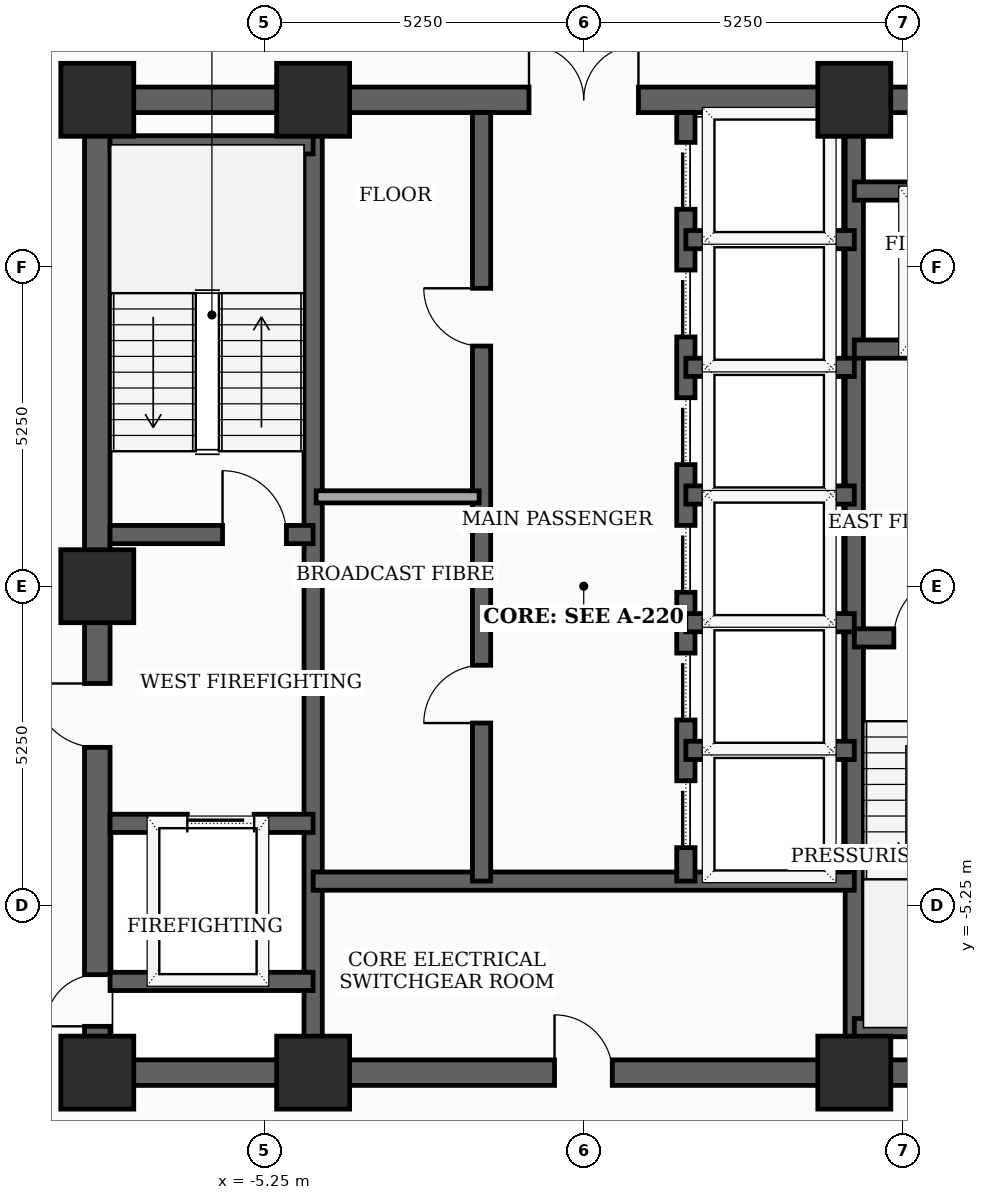
"""IFC4 building model, lengths in metres.
Left out: names, types, materials, properties, quantities, classifications, styles, units other than length and angle.
Written with IfcOpenShell. Run it as: python <this file> out.ifc"""

import sys

from ifc_helpers import new_model, si_unit, direction, frame, frame_2d, origin, origin_2d, place, context, subcontext, project, spatial, rectangle, extrude, element, fill, save


model = new_model("IFC4")
c1 = context("Model", 3, precision=1e-05, world=origin(), true_north=direction((0.0, 1.0)))
c2 = subcontext(c1, "Body", "Model", "MODEL_VIEW")
j1 = project(units=[si_unit("LENGTHUNIT", "METRE"), si_unit("PLANEANGLEUNIT", "RADIAN")], contexts=[c1])
p1 = place(None, origin())
s1 = spatial("IfcSite", under=j1, at=p1, CompositionType="ELEMENT")
p2 = place(p1, origin())
s2 = spatial("IfcBuilding", under=s1, at=p2, CompositionType="ELEMENT")
p3 = place(p2, frame((0.0, 0.0, 187.9)))
s3 = spatial("IfcBuildingStorey", under=s2, at=p3, CompositionType="ELEMENT", Elevation=187.9)
for number, where, z_axis, x_axis in (
    (1, (-8.0, -8.0, 0.0), (0.0, 0.0, 1.0), (1.0, 0.0, 0.0)),
    (2, (-4.45, -8.0, 0.0), (0.0, 0.0, 1.0), (1.0, 0.0, 0.0)),
    (3, (4.45, -8.0, 0.0), (0.0, 0.0, 1.0), (1.0, 0.0, 0.0)),
    (4, (4.45, 8.0, 0.0), (0.0, 0.0, 1.0), (1.0, 0.0, 0.0)),
    (5, (-4.45, 8.0, 0.0), (0.0, 0.0, 1.0), (1.0, 0.0, 0.0)),
    (6, (-8.0, 8.0, 0.0), (0.0, 0.0, 1.0), (1.0, 0.0, 0.0)),
    (7, (-8.0, 0.0, 0.0), (0.0, 0.0, 1.0), (1.0, 0.0, 0.0)),
):
    element("IfcColumn", number, at=place(p3, frame(where, z_axis=z_axis, x_axis=x_axis)), inside=s3, PredefinedType="COLUMN", context=c2, shape_type="SweptSolid", body=[
        extrude(rectangle(XDim=1.2, YDim=1.2, at=origin_2d()), origin(), (0.0, 0.0, 1.0), 3.7),
    ])
p4 = place(p3, frame((-8.0, -8.0, 0.0), z_axis=(0.0, 0.0, 1.0), x_axis=(0.0, 1.0, 0.0)))
e8 = element("IfcWall", 8, at=p4, inside=s3, PredefinedType="SHEAR", context=c2, shape_type="SweptSolid", body=[
    extrude(rectangle(XDim=16.0, YDim=0.42, at=frame_2d((8.0, 0.0))), origin(), (0.0, 0.0, 1.0), 3.5),
])
p5 = place(p4, frame((0.761, 0.0, 0.0)))
e9 = element("IfcOpeningElement", 9, at=p5, cuts=e8, PredefinedType="OPENING", context=c2, shape_type="SweptSolid", body=[
    extrude(rectangle(XDim=0.85, YDim=2.02, at=frame_2d((0.425, 1.01))), frame((0.0, 0.22, 0.0), z_axis=(0.0, -1.0, 0.0), x_axis=(1.0, 0.0, 0.0)), (0.0, 0.0, 1.0), 0.44),
])
p6 = place(p4, frame((5.35, 0.0, 0.0)))
e10 = element("IfcOpeningElement", 10, at=p6, cuts=e8, PredefinedType="OPENING", context=c2, shape_type="SweptSolid", body=[
    extrude(rectangle(XDim=1.05, YDim=2.15, at=frame_2d((0.525, 1.075))), frame((0.0, 0.22, 0.0), z_axis=(0.0, -1.0, 0.0), x_axis=(1.0, 0.0, 0.0)), (0.0, 0.0, 1.0), 0.44),
])
p7 = place(p3, frame((-8.0, -8.0, 0.0), z_axis=(0.0, 0.0, 1.0), x_axis=(1.0, 0.0, 0.0)))
e11 = element("IfcWall", 11, at=p7, inside=s3, PredefinedType="SHEAR", context=c2, shape_type="SweptSolid", body=[
    extrude(rectangle(XDim=16.0, YDim=0.42, at=frame_2d((8.0, 0.0))), origin(), (0.0, 0.0, 1.0), 3.5),
])
p8 = place(p7, frame((7.52, 0.0, 0.0)))
e12 = element("IfcOpeningElement", 12, at=p8, cuts=e11, PredefinedType="OPENING", context=c2, shape_type="SweptSolid", body=[
    extrude(rectangle(XDim=0.95, YDim=2.1, at=frame_2d((0.475, 1.05))), frame((0.0, 0.22, 0.0), z_axis=(0.0, -1.0, 0.0), x_axis=(1.0, 0.0, 0.0)), (0.0, 0.0, 1.0), 0.44),
])
p9 = place(p3, frame((-8.0, 8.0, 0.0), z_axis=(0.0, 0.0, 1.0), x_axis=(1.0, 0.0, 0.0)))
e13 = element("IfcWall", 13, at=p9, inside=s3, PredefinedType="SHEAR", context=c2, shape_type="SweptSolid", body=[
    extrude(rectangle(XDim=16.0, YDim=0.42, at=frame_2d((8.0, 0.0))), origin(), (0.0, 0.0, 1.0), 3.5),
])
p10 = place(p9, frame((7.1, 0.0, 0.0)))
e14 = element("IfcOpeningElement", 14, at=p10, cuts=e13, PredefinedType="OPENING", context=c2, shape_type="SweptSolid", body=[
    extrude(rectangle(XDim=1.8, YDim=2.15, at=frame_2d((0.9, 1.075))), frame((0.0, 0.22, 0.0), z_axis=(0.0, -1.0, 0.0), x_axis=(1.0, 0.0, 0.0)), (0.0, 0.0, 1.0), 0.44),
])
for number, where, z_axis, x_axis in (
    (15, (-4.45, -7.79, 0.0), (0.0, 0.0, 1.0), (0.0, 1.0, 0.0)),
    (16, (4.45, -7.79, 0.0), (0.0, 0.0, 1.0), (0.0, 1.0, 0.0)),
):
    element("IfcWall", number, at=place(p3, frame(where, z_axis=z_axis, x_axis=x_axis)), inside=s3, PredefinedType="SHEAR", context=c2, shape_type="SweptSolid", body=[
        extrude(rectangle(XDim=15.58, YDim=0.3, at=frame_2d((7.79, 0.0))), origin(), (0.0, 0.0, 1.0), 3.5),
    ])
p11 = place(p3, frame((-7.79, 0.85, 0.0), z_axis=(0.0, 0.0, 1.0), x_axis=(1.0, 0.0, 0.0)))
e17 = element("IfcWall", 17, at=p11, inside=s3, PredefinedType="SHEAR", context=c2, shape_type="SweptSolid", body=[
    extrude(rectangle(XDim=3.34, YDim=0.3, at=frame_2d((1.67, 0.0))), origin(), (0.0, 0.0, 1.0), 3.5),
])
p12 = place(p11, frame((1.85, 0.0, 0.0)))
e18 = element("IfcOpeningElement", 18, at=p12, cuts=e17, PredefinedType="OPENING", context=c2, shape_type="SweptSolid", body=[
    extrude(rectangle(XDim=1.05, YDim=2.15, at=frame_2d((0.525, 1.075))), frame((0.0, 0.16, 0.0), z_axis=(0.0, -1.0, 0.0), x_axis=(1.0, 0.0, 0.0)), (0.0, 0.0, 1.0), 0.32),
])
p13 = place(p3, frame((-7.79, 7.26, 0.0), z_axis=(0.0, 0.0, 1.0), x_axis=(1.0, 0.0, 0.0)))
e19 = element("IfcWall", 19, at=p13, inside=s3, PredefinedType="SHEAR", context=c2, shape_type="SweptSolid", body=[
    extrude(rectangle(XDim=3.34, YDim=0.3, at=frame_2d((1.67, 0.0))), origin(), (0.0, 0.0, 1.0), 3.5),
])
p14 = place(p3, frame((4.45, -0.85, 0.0), z_axis=(0.0, 0.0, 1.0), x_axis=(1.0, 0.0, 0.0)))
e20 = element("IfcWall", 20, at=p14, inside=s3, PredefinedType="SHEAR", context=c2, shape_type="SweptSolid", body=[
    extrude(rectangle(XDim=3.34, YDim=0.3, at=frame_2d((1.67, 0.0))), origin(), (0.0, 0.0, 1.0), 3.5),
])
p15 = place(p14, frame((0.65, 0.0, 0.0)))
e21 = element("IfcOpeningElement", 21, at=p15, cuts=e20, PredefinedType="OPENING", context=c2, shape_type="SweptSolid", body=[
    extrude(rectangle(XDim=1.05, YDim=2.15, at=frame_2d((0.525, 1.075))), frame((0.0, 0.16, 0.0), z_axis=(0.0, -1.0, 0.0), x_axis=(1.0, 0.0, 0.0)), (0.0, 0.0, 1.0), 0.32),
])
p16 = place(p3, frame((4.45, -7.26, 0.0), z_axis=(0.0, 0.0, 1.0), x_axis=(1.0, 0.0, 0.0)))
e22 = element("IfcWall", 22, at=p16, inside=s3, PredefinedType="SHEAR", context=c2, shape_type="SweptSolid", body=[
    extrude(rectangle(XDim=3.55, YDim=0.3, at=frame_2d((1.775, 0.0))), origin(), (0.0, 0.0, 1.0), 3.5),
])
p17 = place(p3, frame((-7.79, -3.9, 0.0), z_axis=(0.0, 0.0, 1.0), x_axis=(1.0, 0.0, 0.0)))
e23 = element("IfcWall", 23, at=p17, inside=s3, PredefinedType="SHEAR", context=c2, shape_type="SweptSolid", body=[
    extrude(rectangle(XDim=3.34, YDim=0.3, at=frame_2d((1.67, 0.0))), origin(), (0.0, 0.0, 1.0), 3.5),
])
p18 = place(p17, frame((1.27, 0.0, 0.0)))
e24 = element("IfcOpeningElement", 24, at=p18, cuts=e23, PredefinedType="OPENING", context=c2, shape_type="SweptSolid", body=[
    extrude(rectangle(XDim=1.1, YDim=2.1, at=frame_2d((0.55, 1.05))), frame((0.0, 0.16, 0.0), z_axis=(0.0, -1.0, 0.0), x_axis=(1.0, 0.0, 0.0)), (0.0, 0.0, 1.0), 0.32),
])
p19 = place(p3, frame((-7.79, -6.5, 0.0), z_axis=(0.0, 0.0, 1.0), x_axis=(1.0, 0.0, 0.0)))
e25 = element("IfcWall", 25, at=p19, inside=s3, PredefinedType="SHEAR", context=c2, shape_type="SweptSolid", body=[
    extrude(rectangle(XDim=3.34, YDim=0.3, at=frame_2d((1.67, 0.0))), origin(), (0.0, 0.0, 1.0), 3.5),
])
p20 = place(p3, frame((4.45, 3.9, 0.0), z_axis=(0.0, 0.0, 1.0), x_axis=(1.0, 0.0, 0.0)))
e26 = element("IfcWall", 26, at=p20, inside=s3, PredefinedType="SHEAR", context=c2, shape_type="SweptSolid", body=[
    extrude(rectangle(XDim=3.34, YDim=0.3, at=frame_2d((1.67, 0.0))), origin(), (0.0, 0.0, 1.0), 3.5),
])
p21 = place(p20, frame((1.18, 0.0, 0.0)))
e27 = element("IfcOpeningElement", 27, at=p21, cuts=e26, PredefinedType="OPENING", context=c2, shape_type="SweptSolid", body=[
    extrude(rectangle(XDim=1.1, YDim=2.1, at=frame_2d((0.55, 1.05))), frame((0.0, 0.16, 0.0), z_axis=(0.0, -1.0, 0.0), x_axis=(1.0, 0.0, 0.0)), (0.0, 0.0, 1.0), 0.32),
])
p22 = place(p3, frame((4.45, 6.5, 0.0), z_axis=(0.0, 0.0, 1.0), x_axis=(1.0, 0.0, 0.0)))
e28 = element("IfcWall", 28, at=p22, inside=s3, PredefinedType="SHEAR", context=c2, shape_type="SweptSolid", body=[
    extrude(rectangle(XDim=3.34, YDim=0.3, at=frame_2d((1.67, 0.0))), origin(), (0.0, 0.0, 1.0), 3.5),
])
p23 = place(p3, frame((-4.45, -4.85, 0.0), z_axis=(0.0, 0.0, 1.0), x_axis=(1.0, 0.0, 0.0)))
e29 = element("IfcWall", 29, at=p23, inside=s3, PredefinedType="SHEAR", context=c2, shape_type="SweptSolid", body=[
    extrude(rectangle(XDim=8.9, YDim=0.3, at=frame_2d((4.45, 0.0))), origin(), (0.0, 0.0, 1.0), 3.5),
])
p24 = place(p3, frame((-1.68, -4.85, 0.0), z_axis=(0.0, 0.0, 1.0), x_axis=(0.0, 1.0, 0.0)))
e30 = element("IfcWall", 30, at=p24, inside=s3, PredefinedType="SHEAR", context=c2, shape_type="SweptSolid", body=[
    extrude(rectangle(XDim=12.64, YDim=0.3, at=frame_2d((6.32, 0.0))), origin(), (0.0, 0.0, 1.0), 3.5),
])
p25 = place(p24, frame((2.6, 0.0, 0.0)))
e31 = element("IfcOpeningElement", 31, at=p25, cuts=e30, PredefinedType="OPENING", context=c2, shape_type="SweptSolid", body=[
    extrude(rectangle(XDim=0.95, YDim=2.1, at=frame_2d((0.475, 1.05))), frame((0.0, 0.16, 0.0), z_axis=(0.0, -1.0, 0.0), x_axis=(1.0, 0.0, 0.0)), (0.0, 0.0, 1.0), 0.32),
])
p26 = place(p24, frame((8.8, 0.0, 0.0)))
e32 = element("IfcOpeningElement", 32, at=p26, cuts=e30, PredefinedType="OPENING", context=c2, shape_type="SweptSolid", body=[
    extrude(rectangle(XDim=0.95, YDim=2.1, at=frame_2d((0.475, 1.05))), frame((0.0, 0.16, 0.0), z_axis=(0.0, -1.0, 0.0), x_axis=(1.0, 0.0, 0.0)), (0.0, 0.0, 1.0), 0.32),
])
p27 = place(p3, frame((1.68, -4.85, 0.0), z_axis=(0.0, 0.0, 1.0), x_axis=(0.0, 1.0, 0.0)))
e33 = element("IfcWall", 33, at=p27, inside=s3, PredefinedType="SHEAR", context=c2, shape_type="SweptSolid", body=[
    extrude(rectangle(XDim=12.64, YDim=0.3, at=frame_2d((6.32, 0.0))), origin(), (0.0, 0.0, 1.0), 3.5),
])
p28 = place(p27, frame((0.55, 0.0, 0.0)))
e34 = element("IfcOpeningElement", 34, at=p28, cuts=e33, PredefinedType="OPENING", context=c2, shape_type="SweptSolid", body=[
    extrude(rectangle(XDim=1.1, YDim=2.1, at=frame_2d((0.55, 1.05))), frame((0.0, 0.16, 0.0), z_axis=(0.0, -1.0, 0.0), x_axis=(1.0, 0.0, 0.0)), (0.0, 0.0, 1.0), 0.32),
])
p29 = place(p27, frame((2.65, 0.0, 0.0)))
e35 = element("IfcOpeningElement", 35, at=p29, cuts=e33, PredefinedType="OPENING", context=c2, shape_type="SweptSolid", body=[
    extrude(rectangle(XDim=1.1, YDim=2.1, at=frame_2d((0.55, 1.05))), frame((0.0, 0.16, 0.0), z_axis=(0.0, -1.0, 0.0), x_axis=(1.0, 0.0, 0.0)), (0.0, 0.0, 1.0), 0.32),
])
p30 = place(p27, frame((4.75, 0.0, 0.0)))
e36 = element("IfcOpeningElement", 36, at=p30, cuts=e33, PredefinedType="OPENING", context=c2, shape_type="SweptSolid", body=[
    extrude(rectangle(XDim=1.1, YDim=2.1, at=frame_2d((0.55, 1.05))), frame((0.0, 0.16, 0.0), z_axis=(0.0, -1.0, 0.0), x_axis=(1.0, 0.0, 0.0)), (0.0, 0.0, 1.0), 0.32),
])
p31 = place(p27, frame((6.85, 0.0, 0.0)))
e37 = element("IfcOpeningElement", 37, at=p31, cuts=e33, PredefinedType="OPENING", context=c2, shape_type="SweptSolid", body=[
    extrude(rectangle(XDim=1.1, YDim=2.1, at=frame_2d((0.55, 1.05))), frame((0.0, 0.16, 0.0), z_axis=(0.0, -1.0, 0.0), x_axis=(1.0, 0.0, 0.0)), (0.0, 0.0, 1.0), 0.32),
])
p32 = place(p27, frame((8.95, 0.0, 0.0)))
e38 = element("IfcOpeningElement", 38, at=p32, cuts=e33, PredefinedType="OPENING", context=c2, shape_type="SweptSolid", body=[
    extrude(rectangle(XDim=1.1, YDim=2.1, at=frame_2d((0.55, 1.05))), frame((0.0, 0.16, 0.0), z_axis=(0.0, -1.0, 0.0), x_axis=(1.0, 0.0, 0.0)), (0.0, 0.0, 1.0), 0.32),
])
p33 = place(p27, frame((11.05, 0.0, 0.0)))
e39 = element("IfcOpeningElement", 39, at=p33, cuts=e33, PredefinedType="OPENING", context=c2, shape_type="SweptSolid", body=[
    extrude(rectangle(XDim=1.1, YDim=2.1, at=frame_2d((0.55, 1.05))), frame((0.0, 0.16, 0.0), z_axis=(0.0, -1.0, 0.0), x_axis=(1.0, 0.0, 0.0)), (0.0, 0.0, 1.0), 0.32),
])
for number, where, z_axis, x_axis in (
    (40, (1.68, 1.5, 0.0), (0.0, 0.0, 1.0), (1.0, 0.0, 0.0)),
    (41, (1.68, 3.6, 0.0), (0.0, 0.0, 1.0), (1.0, 0.0, 0.0)),
    (42, (1.68, 5.7, 0.0), (0.0, 0.0, 1.0), (1.0, 0.0, 0.0)),
    (43, (1.68, -2.7, 0.0), (0.0, 0.0, 1.0), (1.0, 0.0, 0.0)),
    (44, (1.68, -0.6, 0.0), (0.0, 0.0, 1.0), (1.0, 0.0, 0.0)),
):
    element("IfcWall", number, at=place(p3, frame(where, z_axis=z_axis, x_axis=x_axis)), inside=s3, PredefinedType="SHEAR", context=c2, shape_type="SweptSolid", body=[
        extrude(rectangle(XDim=2.77, YDim=0.3, at=frame_2d((1.385, 0.0))), origin(), (0.0, 0.0, 1.0), 3.5),
    ])
p34 = place(p3, frame((-4.4, 1.47, 0.0), z_axis=(0.0, 0.0, 1.0), x_axis=(1.0, 0.0, 0.0)))
e45 = element("IfcWall", 45, at=p34, inside=s3, PredefinedType="SOLIDWALL", context=c2, shape_type="SweptSolid", body=[
    extrude(rectangle(XDim=2.68, YDim=0.2, at=frame_2d((1.34, 0.0))), origin(), (0.0, 0.0, 1.0), 3.5),
])
p35 = place(p5, origin())
e46 = element("IfcDoor", 46, at=p35, inside=s3, OperationType="SINGLE_SWING_LEFT", PredefinedType="TRAPDOOR", context=c2, shape_type="SweptSolid", body=[
    extrude(rectangle(XDim=0.85, YDim=2.02, at=frame_2d((0.425, 1.01))), frame((0.0, 0.025, 0.0), z_axis=(0.0, -1.0, 0.0), x_axis=(1.0, 0.0, 0.0)), (0.0, 0.0, 1.0), 0.05),
])
fill(e9, e46)
p36 = place(p6, origin())
e47 = element("IfcDoor", 47, at=p36, inside=s3, OperationType="SINGLE_SWING_RIGHT", PredefinedType="DOOR", context=c2, shape_type="SweptSolid", body=[
    extrude(rectangle(XDim=1.05, YDim=2.15, at=frame_2d((0.525, 1.075))), frame((0.0, 0.025, 0.0), z_axis=(0.0, -1.0, 0.0), x_axis=(1.0, 0.0, 0.0)), (0.0, 0.0, 1.0), 0.05),
])
fill(e10, e47)
p37 = place(p8, origin())
e48 = element("IfcDoor", 48, at=p37, inside=s3, OperationType="SINGLE_SWING_LEFT", PredefinedType="DOOR", context=c2, shape_type="SweptSolid", body=[
    extrude(rectangle(XDim=0.95, YDim=2.1, at=frame_2d((0.475, 1.05))), frame((0.0, 0.025, 0.0), z_axis=(0.0, -1.0, 0.0), x_axis=(1.0, 0.0, 0.0)), (0.0, 0.0, 1.0), 0.05),
])
fill(e12, e48)
p38 = place(p10, origin())
e49 = element("IfcDoor", 49, at=p38, inside=s3, OperationType="DOUBLE_DOOR_SINGLE_SWING", PredefinedType="DOOR", context=c2, shape_type="SweptSolid", body=[
    extrude(rectangle(XDim=1.8, YDim=2.15, at=frame_2d((0.9, 1.075))), frame((0.0, 0.025, 0.0), z_axis=(0.0, -1.0, 0.0), x_axis=(1.0, 0.0, 0.0)), (0.0, 0.0, 1.0), 0.05),
])
fill(e14, e49)
p39 = place(p12, origin())
e50 = element("IfcDoor", 50, at=p39, inside=s3, OperationType="SINGLE_SWING_LEFT", PredefinedType="DOOR", context=c2, shape_type="SweptSolid", body=[
    extrude(rectangle(XDim=1.05, YDim=2.15, at=frame_2d((0.525, 1.075))), frame((0.0, 0.025, 0.0), z_axis=(0.0, -1.0, 0.0), x_axis=(1.0, 0.0, 0.0)), (0.0, 0.0, 1.0), 0.05),
])
fill(e18, e50)
p40 = place(p15, origin())
e51 = element("IfcDoor", 51, at=p40, inside=s3, OperationType="SINGLE_SWING_RIGHT", PredefinedType="DOOR", context=c2, shape_type="SweptSolid", body=[
    extrude(rectangle(XDim=1.05, YDim=2.15, at=frame_2d((0.525, 1.075))), frame((0.0, 0.025, 0.0), z_axis=(0.0, -1.0, 0.0), x_axis=(1.0, 0.0, 0.0)), (0.0, 0.0, 1.0), 0.05),
])
fill(e21, e51)
p41 = place(p18, origin())
e52 = element("IfcDoor", 52, at=p41, inside=s3, OperationType="SLIDING_TO_LEFT", PredefinedType="DOOR", context=c2, shape_type="SweptSolid", body=[
    extrude(rectangle(XDim=1.1, YDim=2.1, at=frame_2d((0.55, 1.05))), frame((0.0, 0.025, 0.0), z_axis=(0.0, -1.0, 0.0), x_axis=(1.0, 0.0, 0.0)), (0.0, 0.0, 1.0), 0.05),
])
fill(e24, e52)
p42 = place(p25, origin())
e53 = element("IfcDoor", 53, at=p42, inside=s3, OperationType="SINGLE_SWING_LEFT", PredefinedType="DOOR", context=c2, shape_type="SweptSolid", body=[
    extrude(rectangle(XDim=0.95, YDim=2.1, at=frame_2d((0.475, 1.05))), frame((0.0, 0.025, 0.0), z_axis=(0.0, -1.0, 0.0), x_axis=(1.0, 0.0, 0.0)), (0.0, 0.0, 1.0), 0.05),
])
fill(e31, e53)
p43 = place(p26, origin())
e54 = element("IfcDoor", 54, at=p43, inside=s3, OperationType="SINGLE_SWING_RIGHT", PredefinedType="DOOR", context=c2, shape_type="SweptSolid", body=[
    extrude(rectangle(XDim=0.95, YDim=2.1, at=frame_2d((0.475, 1.05))), frame((0.0, 0.025, 0.0), z_axis=(0.0, -1.0, 0.0), x_axis=(1.0, 0.0, 0.0)), (0.0, 0.0, 1.0), 0.05),
])
fill(e32, e54)
p44 = place(p28, origin())
e55 = element("IfcDoor", 55, at=p44, inside=s3, OperationType="SLIDING_TO_LEFT", PredefinedType="DOOR", context=c2, shape_type="SweptSolid", body=[
    extrude(rectangle(XDim=1.1, YDim=2.1, at=frame_2d((0.55, 1.05))), frame((0.0, 0.025, 0.0), z_axis=(0.0, -1.0, 0.0), x_axis=(1.0, 0.0, 0.0)), (0.0, 0.0, 1.0), 0.05),
])
fill(e34, e55)
p45 = place(p29, origin())
e56 = element("IfcDoor", 56, at=p45, inside=s3, OperationType="SLIDING_TO_LEFT", PredefinedType="DOOR", context=c2, shape_type="SweptSolid", body=[
    extrude(rectangle(XDim=1.1, YDim=2.1, at=frame_2d((0.55, 1.05))), frame((0.0, 0.025, 0.0), z_axis=(0.0, -1.0, 0.0), x_axis=(1.0, 0.0, 0.0)), (0.0, 0.0, 1.0), 0.05),
])
fill(e35, e56)
p46 = place(p30, origin())
e57 = element("IfcDoor", 57, at=p46, inside=s3, OperationType="SLIDING_TO_LEFT", PredefinedType="DOOR", context=c2, shape_type="SweptSolid", body=[
    extrude(rectangle(XDim=1.1, YDim=2.1, at=frame_2d((0.55, 1.05))), frame((0.0, 0.025, 0.0), z_axis=(0.0, -1.0, 0.0), x_axis=(1.0, 0.0, 0.0)), (0.0, 0.0, 1.0), 0.05),
])
fill(e36, e57)
p47 = place(p31, origin())
e58 = element("IfcDoor", 58, at=p47, inside=s3, OperationType="SLIDING_TO_LEFT", PredefinedType="DOOR", context=c2, shape_type="SweptSolid", body=[
    extrude(rectangle(XDim=1.1, YDim=2.1, at=frame_2d((0.55, 1.05))), frame((0.0, 0.025, 0.0), z_axis=(0.0, -1.0, 0.0), x_axis=(1.0, 0.0, 0.0)), (0.0, 0.0, 1.0), 0.05),
])
fill(e37, e58)
p48 = place(p32, origin())
e59 = element("IfcDoor", 59, at=p48, inside=s3, OperationType="SLIDING_TO_LEFT", PredefinedType="DOOR", context=c2, shape_type="SweptSolid", body=[
    extrude(rectangle(XDim=1.1, YDim=2.1, at=frame_2d((0.55, 1.05))), frame((0.0, 0.025, 0.0), z_axis=(0.0, -1.0, 0.0), x_axis=(1.0, 0.0, 0.0)), (0.0, 0.0, 1.0), 0.05),
])
fill(e38, e59)
p49 = place(p33, origin())
e60 = element("IfcDoor", 60, at=p49, inside=s3, OperationType="SLIDING_TO_LEFT", PredefinedType="DOOR", context=c2, shape_type="SweptSolid", body=[
    extrude(rectangle(XDim=1.1, YDim=2.1, at=frame_2d((0.55, 1.05))), frame((0.0, 0.025, 0.0), z_axis=(0.0, -1.0, 0.0), x_axis=(1.0, 0.0, 0.0)), (0.0, 0.0, 1.0), 0.05),
])
fill(e39, e60)
save(model, sys.argv[1])
